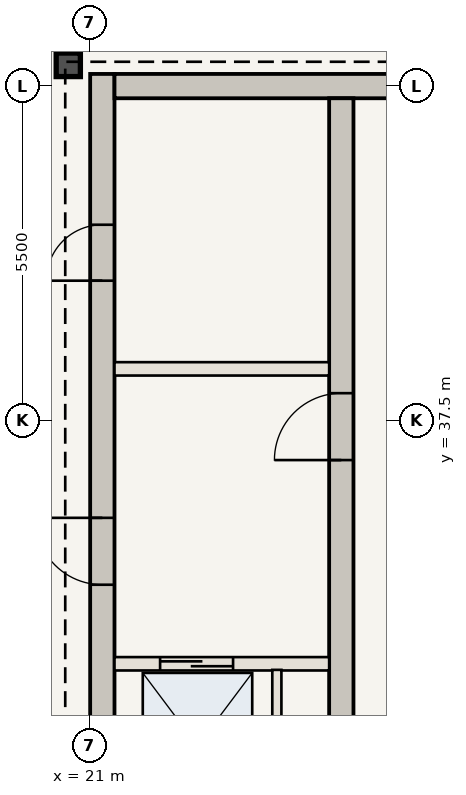
"""IFC4 building model, lengths in metres.
Left out: names, types, materials, properties, quantities, classifications, styles, units other than length and angle.
Written with IfcOpenShell. Run it as: python <this file> out.ifc"""

import sys

from ifc_helpers import new_model, si_unit, direction, frame, frame_2d, origin, origin_2d, place, context, subcontext, project, spatial, rectangle, i_section, extrude, element, fill, save


model = new_model("IFC4")
c1 = context("Model", 3, precision=1e-05, world=origin(), true_north=direction((0.0, 1.0)))
c2 = subcontext(c1, "Body", "Model", "MODEL_VIEW")
j1 = project(units=[si_unit("LENGTHUNIT", "METRE"), si_unit("PLANEANGLEUNIT", "RADIAN")], contexts=[c1])
p1 = place(None, origin())
s1 = spatial("IfcSite", under=j1, at=p1, CompositionType="ELEMENT")
p2 = place(p1, origin())
s2 = spatial("IfcBuilding", under=s1, at=p2, CompositionType="ELEMENT")
p3 = place(p2, frame((0.0, 0.0, 331.45)))
s3 = spatial("IfcBuildingStorey", under=s2, at=p3, CompositionType="ELEMENT", Elevation=331.45)
p4 = place(p3, frame((21.21, 30.6, 0.0), z_axis=(0.0, 0.0, 1.0), x_axis=(0.0, 1.0, 0.0)))
e1 = element("IfcWall", 1, at=p4, inside=s3, PredefinedType="SHEAR", context=c2, shape_type="SweptSolid", body=[
    extrude(rectangle(XDim=12.6, YDim=0.4, at=frame_2d((6.3, 0.0))), origin(), (0.0, 0.0, 1.0), 5.6),
])
p5 = place(p4, frame((4.2, 0.0, 0.0)))
e2 = element("IfcOpeningElement", 2, at=p5, cuts=e1, PredefinedType="OPENING", context=c2, shape_type="SweptSolid", body=[
    extrude(rectangle(XDim=1.1, YDim=2.15, at=frame_2d((0.55, 1.075))), frame((0.0, 0.21, 0.0), z_axis=(0.0, -1.0, 0.0), x_axis=(1.0, 0.0, 0.0)), (0.0, 0.0, 1.0), 0.42),
])
p6 = place(p4, frame((9.2, 0.0, 0.0)))
e3 = element("IfcOpeningElement", 3, at=p6, cuts=e1, PredefinedType="OPENING", context=c2, shape_type="SweptSolid", body=[
    extrude(rectangle(XDim=0.92, YDim=2.1, at=frame_2d((0.46, 1.05))), frame((0.0, 0.21, 0.0), z_axis=(0.0, -1.0, 0.0), x_axis=(1.0, 0.0, 0.0)), (0.0, 0.0, 1.0), 0.42),
])
p7 = place(p3, frame((21.41, 43.0, 0.0), z_axis=(0.0, 0.0, 1.0), x_axis=(1.0, 0.0, 0.0)))
e4 = element("IfcWall", 4, at=p7, inside=s3, PredefinedType="SHEAR", context=c2, shape_type="SweptSolid", body=[
    extrude(rectangle(XDim=21.18, YDim=0.4, at=frame_2d((10.59, 0.0))), origin(), (0.0, 0.0, 1.0), 5.6),
])
p8 = place(p7, frame((14.1, 0.0, 0.0)))
e5 = element("IfcOpeningElement", 5, at=p8, cuts=e4, PredefinedType="OPENING", context=c2, shape_type="SweptSolid", body=[
    extrude(rectangle(XDim=1.1, YDim=2.15, at=frame_2d((0.55, 1.075))), frame((0.0, 0.21, 0.0), z_axis=(0.0, -1.0, 0.0), x_axis=(1.0, 0.0, 0.0)), (0.0, 0.0, 1.0), 0.42),
])
p9 = place(p3, frame((25.14, 30.6, 0.0), z_axis=(0.0, 0.0, 1.0), x_axis=(0.0, 1.0, 0.0)))
e6 = element("IfcWall", 6, at=p9, inside=s3, PredefinedType="SHEAR", context=c2, shape_type="SweptSolid", body=[
    extrude(rectangle(XDim=12.2, YDim=0.4, at=frame_2d((6.1, 0.0))), origin(), (0.0, 0.0, 1.0), 5.6),
])
p10 = place(p9, frame((6.25, 0.0, 0.0)))
e7 = element("IfcOpeningElement", 7, at=p10, cuts=e6, PredefinedType="OPENING", context=c2, shape_type="SweptSolid", body=[
    extrude(rectangle(XDim=1.1, YDim=2.15, at=frame_2d((0.55, 1.075))), frame((0.0, 0.21, 0.0), z_axis=(0.0, -1.0, 0.0), x_axis=(1.0, 0.0, 0.0)), (0.0, 0.0, 1.0), 0.42),
])
p11 = place(p3, frame((20.65, 43.35, 0.0), z_axis=(0.0, 0.0, 1.0), x_axis=(1.0, 0.0, 0.0)))
e8 = element("IfcColumn", 8, at=p11, inside=s3, PredefinedType="COLUMN", context=c2, shape_type="SweptSolid", body=[
    extrude(i_section(OverallWidth=0.398, OverallDepth=0.387, WebThickness=0.021, FlangeThickness=0.033, at=origin_2d()), origin(), (0.0, 0.0, 1.0), 18.839),
])
p12 = place(p3, frame((21.41, 33.5, 0.0), z_axis=(0.0, 0.0, 1.0), x_axis=(1.0, 0.0, 0.0)))
e9 = element("IfcWall", 9, at=p12, inside=s3, PredefinedType="STANDARD", context=c2, shape_type="SweptSolid", body=[
    extrude(rectangle(XDim=3.53, YDim=0.22, at=frame_2d((1.765, 0.0))), origin(), (0.0, 0.0, 1.0), 5.35),
])
p13 = place(p12, frame((0.75, 0.0, 0.0)))
e10 = element("IfcOpeningElement", 10, at=p13, cuts=e9, PredefinedType="OPENING", context=c2, shape_type="SweptSolid", body=[
    extrude(rectangle(XDim=1.2, YDim=2.2, at=frame_2d((0.6, 1.1))), frame((0.0, 0.12, 0.0), z_axis=(0.0, -1.0, 0.0), x_axis=(1.0, 0.0, 0.0)), (0.0, 0.0, 1.0), 0.24),
])
p14 = place(p3, frame((24.08, 30.75, 0.0), z_axis=(0.0, 0.0, 1.0), x_axis=(0.0, 1.0, 0.0)))
e11 = element("IfcWall", 11, at=p14, inside=s3, PredefinedType="STANDARD", context=c2, shape_type="SweptSolid", body=[
    extrude(rectangle(XDim=2.65, YDim=0.15, at=frame_2d((1.325, 0.0))), origin(), (0.0, 0.0, 1.0), 5.35),
])
p15 = place(p3, frame((21.41, 38.35, 0.0), z_axis=(0.0, 0.0, 1.0), x_axis=(1.0, 0.0, 0.0)))
e12 = element("IfcWall", 12, at=p15, inside=s3, PredefinedType="STANDARD", context=c2, shape_type="SweptSolid", body=[
    extrude(rectangle(XDim=3.53, YDim=0.22, at=frame_2d((1.765, 0.0))), origin(), (0.0, 0.0, 1.0), 5.35),
])
p16 = place(p5, origin())
e13 = element("IfcDoor", 13, at=p16, inside=s3, OperationType="SINGLE_SWING_RIGHT", PredefinedType="DOOR", context=c2, shape_type="SweptSolid", body=[
    extrude(rectangle(XDim=1.1, YDim=2.15, at=frame_2d((0.55, 1.075))), frame((0.0, 0.025, 0.0), z_axis=(0.0, -1.0, 0.0), x_axis=(1.0, 0.0, 0.0)), (0.0, 0.0, 1.0), 0.05),
])
fill(e2, e13)
p17 = place(p10, origin())
e14 = element("IfcDoor", 14, at=p17, inside=s3, OperationType="SINGLE_SWING_LEFT", PredefinedType="DOOR", context=c2, shape_type="SweptSolid", body=[
    extrude(rectangle(XDim=1.1, YDim=2.15, at=frame_2d((0.55, 1.075))), frame((0.0, 0.025, 0.0), z_axis=(0.0, -1.0, 0.0), x_axis=(1.0, 0.0, 0.0)), (0.0, 0.0, 1.0), 0.05),
])
fill(e7, e14)
p18 = place(p6, origin())
e15 = element("IfcDoor", 15, at=p18, inside=s3, OperationType="SINGLE_SWING_LEFT", PredefinedType="DOOR", context=c2, shape_type="SweptSolid", body=[
    extrude(rectangle(XDim=0.92, YDim=2.1, at=frame_2d((0.46, 1.05))), frame((0.0, 0.025, 0.0), z_axis=(0.0, -1.0, 0.0), x_axis=(1.0, 0.0, 0.0)), (0.0, 0.0, 1.0), 0.05),
])
fill(e3, e15)
p19 = place(p13, origin())
e16 = element("IfcDoor", 16, at=p19, inside=s3, OperationType="DOUBLE_DOOR_SLIDING", PredefinedType="DOOR", context=c2, shape_type="SweptSolid", body=[
    extrude(rectangle(XDim=1.2, YDim=2.2, at=frame_2d((0.6, 1.1))), frame((0.0, 0.025, 0.0), z_axis=(0.0, -1.0, 0.0), x_axis=(1.0, 0.0, 0.0)), (0.0, 0.0, 1.0), 0.05),
])
fill(e10, e16)
save(model, sys.argv[1])
